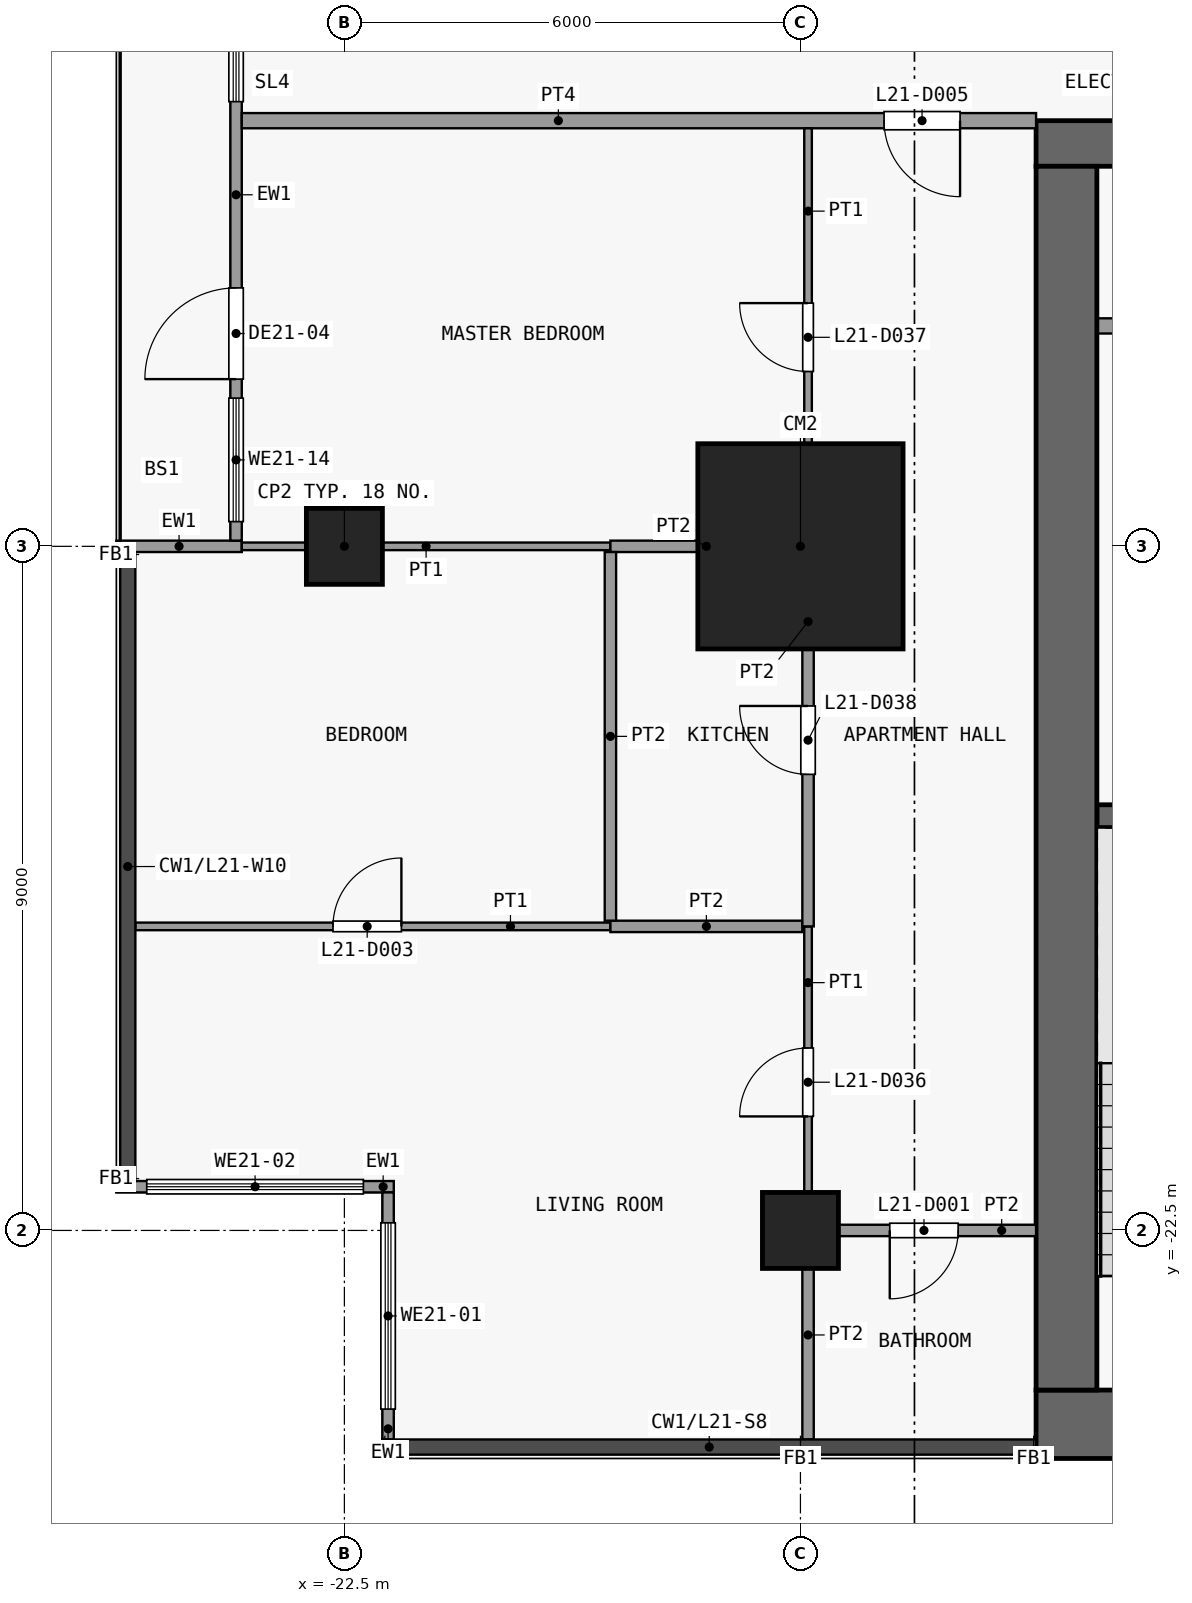
"""IFC4 building model, lengths in metres.
Left out: names, types, materials, properties, quantities, classifications, styles, units other than length and angle.
Written with IfcOpenShell. Run it as: python <this file> out.ifc"""

import sys

from ifc_helpers import new_model, si_unit, direction, frame, frame_2d, origin, origin_2d, place, context, subcontext, project, spatial, rectangle, extrude, element, fill, save


model = new_model("IFC4")
c1 = context("Model", 3, precision=1e-05, world=origin(), true_north=direction((0.0, 1.0)))
c2 = subcontext(c1, "Body", "Model", "MODEL_VIEW")
j1 = project(units=[si_unit("LENGTHUNIT", "METRE"), si_unit("PLANEANGLEUNIT", "RADIAN")], contexts=[c1])
p1 = place(None, origin())
s1 = spatial("IfcSite", under=j1, at=p1, CompositionType="ELEMENT")
p2 = place(p1, origin())
s2 = spatial("IfcBuilding", under=s1, at=p2, CompositionType="ELEMENT")
p3 = place(p2, frame((0.0, 0.0, 88.3)))
s3 = spatial("IfcBuildingStorey", under=s2, at=p3, CompositionType="ELEMENT", Elevation=88.3)
for number, where, z_axis, x_axis in (
    (1, (-22.5, -13.5, 0.0), (0.0, 0.0, 1.0), (1.0, 0.0, 0.0)),
    (2, (-16.5, -22.5, 0.0), (0.0, 0.0, 1.0), (1.0, 0.0, 0.0)),
):
    element("IfcColumn", number, at=place(p3, frame(where, z_axis=z_axis, x_axis=x_axis)), inside=s3, PredefinedType="COLUMN", context=c2, shape_type="SweptSolid", body=[
        extrude(rectangle(XDim=1.0, YDim=1.0, at=origin_2d()), origin(), (0.0, 0.0, 1.0), 3.6),
    ])
p4 = place(p3, frame((-16.5, -13.5, 0.0), z_axis=(0.0, 0.0, 1.0), x_axis=(1.0, 0.0, 0.0)))
e3 = element("IfcColumn", 3, at=p4, inside=s3, PredefinedType="COLUMN", context=c2, shape_type="SweptSolid", body=[
    extrude(rectangle(XDim=2.7, YDim=2.7, at=origin_2d()), origin(), (0.0, 0.0, 1.0), 3.6),
])
p5 = place(p3, frame((-13.4, -25.05, 0.0), z_axis=(0.0, 0.0, 1.0), x_axis=(1.0, 0.0, 0.0)))
e4 = element("IfcWall", 4, at=p5, inside=s3, PredefinedType="SHEAR", context=c2, shape_type="SweptSolid", body=[
    extrude(rectangle(XDim=26.8, YDim=0.9, at=frame_2d((13.4, 0.0))), origin(), (0.0, 0.0, 1.0), 3.3),
])
p6 = place(p3, frame((-13.4, -8.2, 0.0), z_axis=(0.0, 0.0, 1.0), x_axis=(1.0, 0.0, 0.0)))
e5 = element("IfcWall", 5, at=p6, inside=s3, PredefinedType="SHEAR", context=c2, shape_type="SweptSolid", body=[
    extrude(rectangle(XDim=26.8, YDim=0.6, at=frame_2d((13.4, 0.0))), origin(), (0.0, 0.0, 1.0), 3.3),
])
p7 = place(p6, frame((7.7, 0.0, 0.0)))
e6 = element("IfcOpeningElement", 6, at=p7, cuts=e5, PredefinedType="OPENING", context=c2, shape_type="SweptSolid", body=[
    extrude(rectangle(XDim=1.8, YDim=2.1, at=frame_2d((0.9, 1.05))), frame((0.0, 0.31, 0.0), z_axis=(0.0, -1.0, 0.0), x_axis=(1.0, 0.0, 0.0)), (0.0, 0.0, 1.0), 0.62),
])
p8 = place(p6, frame((17.3, 0.0, 0.0)))
e7 = element("IfcOpeningElement", 7, at=p8, cuts=e5, PredefinedType="OPENING", context=c2, shape_type="SweptSolid", body=[
    extrude(rectangle(XDim=1.8, YDim=2.1, at=frame_2d((0.9, 1.05))), frame((0.0, 0.31, 0.0), z_axis=(0.0, -1.0, 0.0), x_axis=(1.0, 0.0, 0.0)), (0.0, 0.0, 1.0), 0.62),
])
p9 = place(p6, frame((2.625, 0.0, 0.0)))
e8 = element("IfcOpeningElement", 8, at=p9, cuts=e5, PredefinedType="OPENING", context=c2, shape_type="SweptSolid", body=[
    extrude(rectangle(XDim=0.9, YDim=2.1, at=frame_2d((0.45, 1.05))), frame((0.0, 0.31, 0.0), z_axis=(0.0, -1.0, 0.0), x_axis=(1.0, 0.0, 0.0)), (0.0, 0.0, 1.0), 0.62),
])
p10 = place(p6, frame((23.275, 0.0, 0.0)))
e9 = element("IfcOpeningElement", 9, at=p10, cuts=e5, PredefinedType="OPENING", context=c2, shape_type="SweptSolid", body=[
    extrude(rectangle(XDim=0.9, YDim=2.1, at=frame_2d((0.45, 1.05))), frame((0.0, 0.31, 0.0), z_axis=(0.0, -1.0, 0.0), x_axis=(1.0, 0.0, 0.0)), (0.0, 0.0, 1.0), 0.62),
])
p11 = place(p3, frame((-13.0, -24.6, 0.0), z_axis=(0.0, 0.0, 1.0), x_axis=(0.0, 1.0, 0.0)))
e10 = element("IfcWall", 10, at=p11, inside=s3, PredefinedType="SHEAR", context=c2, shape_type="SweptSolid", body=[
    extrude(rectangle(XDim=16.1, YDim=0.8, at=frame_2d((8.05, 0.0))), origin(), (0.0, 0.0, 1.0), 3.3),
])
p12 = place(p3, frame((-12.6, -17.05, 0.0), z_axis=(0.0, 0.0, 1.0), x_axis=(1.0, 0.0, 0.0)))
e11 = element("IfcWall", 11, at=p12, inside=s3, PredefinedType="SHEAR", context=c2, shape_type="SweptSolid", body=[
    extrude(rectangle(XDim=2.85, YDim=0.3, at=frame_2d((1.425, 0.0))), origin(), (0.0, 0.0, 1.0), 3.3),
])
p13 = place(p3, frame((-12.6, -10.6, 0.0), z_axis=(0.0, 0.0, 1.0), x_axis=(1.0, 0.0, 0.0)))
e12 = element("IfcWall", 12, at=p13, inside=s3, PredefinedType="PARTITIONING", context=c2, shape_type="SweptSolid", body=[
    extrude(rectangle(XDim=1.45, YDim=0.2, at=frame_2d((0.725, 0.0))), origin(), (0.0, 0.0, 1.0), 3.3),
])
p14 = place(p3, frame((-21.925, -25.25, 0.0), z_axis=(0.0, 0.0, 1.0), x_axis=(0.0, 1.0, 0.0)))
e13 = element("IfcWall", 13, at=p14, inside=s3, PredefinedType="SOLIDWALL", context=c2, shape_type="SweptSolid", body=[
    extrude(rectangle(XDim=3.25, YDim=0.15, at=frame_2d((1.625, 0.0))), origin(), (0.0, 0.0, 1.0), 3.3),
])
p15 = place(p14, frame((0.4, 0.0, 0.9)))
e14 = element("IfcOpeningElement", 14, at=p15, cuts=e13, PredefinedType="OPENING", context=c2, shape_type="SweptSolid", body=[
    extrude(rectangle(XDim=2.45, YDim=2.4, at=frame_2d((1.225, 1.2))), frame((0.0, 0.085, 0.0), z_axis=(0.0, -1.0, 0.0), x_axis=(1.0, 0.0, 0.0)), (0.0, 0.0, 1.0), 0.17),
])
p16 = place(p3, frame((-21.85, -21.925, 0.0), z_axis=(0.0, 0.0, 1.0), x_axis=(-1.0, 0.0, 0.0)))
e15 = element("IfcWall", 15, at=p16, inside=s3, PredefinedType="SOLIDWALL", context=c2, shape_type="SweptSolid", body=[
    extrude(rectangle(XDim=3.65, YDim=0.15, at=frame_2d((1.825, 0.0))), origin(), (0.0, 0.0, 1.0), 3.3),
])
p17 = place(p16, frame((0.4, 0.0, 0.9)))
e16 = element("IfcOpeningElement", 16, at=p17, cuts=e15, PredefinedType="OPENING", context=c2, shape_type="SweptSolid", body=[
    extrude(rectangle(XDim=2.85, YDim=2.4, at=frame_2d((1.425, 1.2))), frame((0.0, 0.085, 0.0), z_axis=(0.0, -1.0, 0.0), x_axis=(1.0, 0.0, 0.0)), (0.0, 0.0, 1.0), 0.17),
])
p18 = place(p3, frame((-23.85, -13.5, 0.0), z_axis=(0.0, 0.0, 1.0), x_axis=(-1.0, 0.0, 0.0)))
e17 = element("IfcWall", 17, at=p18, inside=s3, PredefinedType="SOLIDWALL", context=c2, shape_type="SweptSolid", body=[
    extrude(rectangle(XDim=1.65, YDim=0.15, at=frame_2d((0.825, 0.0))), origin(), (0.0, 0.0, 1.0), 3.3),
])
p19 = place(p3, frame((-23.925, -13.425, 0.0), z_axis=(0.0, 0.0, 1.0), x_axis=(0.0, 1.0, 0.0)))
e18 = element("IfcWall", 18, at=p19, inside=s3, PredefinedType="SOLIDWALL", context=c2, shape_type="SweptSolid", body=[
    extrude(rectangle(XDim=8.85, YDim=0.15, at=frame_2d((4.425, 0.0))), origin(), (0.0, 0.0, 1.0), 3.3),
])
p20 = place(p19, frame((2.125, 0.0, 0.0)))
e19 = element("IfcOpeningElement", 19, at=p20, cuts=e18, PredefinedType="OPENING", context=c2, shape_type="SweptSolid", body=[
    extrude(rectangle(XDim=1.2, YDim=2.4, at=frame_2d((0.6, 1.2))), frame((0.0, 0.085, 0.0), z_axis=(0.0, -1.0, 0.0), x_axis=(1.0, 0.0, 0.0)), (0.0, 0.0, 1.0), 0.17),
])
p21 = place(p19, frame((0.25, 0.0, 0.9)))
e20 = element("IfcOpeningElement", 20, at=p21, cuts=e18, PredefinedType="OPENING", context=c2, shape_type="SweptSolid", body=[
    extrude(rectangle(XDim=1.625, YDim=2.1, at=frame_2d((0.812, 1.05))), frame((0.0, 0.085, 0.0), z_axis=(0.0, -1.0, 0.0), x_axis=(1.0, 0.0, 0.0)), (0.0, 0.0, 1.0), 0.17),
])
p22 = place(p19, frame((5.775, 0.0, 0.9)))
e21 = element("IfcOpeningElement", 21, at=p22, cuts=e18, PredefinedType="OPENING", context=c2, shape_type="SweptSolid", body=[
    extrude(rectangle(XDim=1.812, YDim=2.1, at=frame_2d((0.906, 1.05))), frame((0.0, 0.085, 0.0), z_axis=(0.0, -1.0, 0.0), x_axis=(1.0, 0.0, 0.0)), (0.0, 0.0, 1.0), 0.17),
])
p23 = place(p3, frame((-16.325, -22.5, 0.0), z_axis=(0.0, 0.0, 1.0), x_axis=(1.0, 0.0, 0.0)))
e22 = element("IfcWall", 22, at=p23, inside=s3, PredefinedType="PARTITIONING", context=c2, shape_type="SweptSolid", body=[
    extrude(rectangle(XDim=2.925, YDim=0.15, at=frame_2d((1.462, 0.0))), origin(), (0.0, 0.0, 1.0), 3.3),
])
p24 = place(p23, frame((1.0, 0.0, 0.0)))
e23 = element("IfcOpeningElement", 23, at=p24, cuts=e22, PredefinedType="OPENING", context=c2, shape_type="SweptSolid", body=[
    extrude(rectangle(XDim=0.9, YDim=2.1, at=frame_2d((0.45, 1.05))), frame((0.0, 0.085, 0.0), z_axis=(0.0, -1.0, 0.0), x_axis=(1.0, 0.0, 0.0)), (0.0, 0.0, 1.0), 0.17),
])
p25 = place(p3, frame((-25.25, -18.5, 0.0), z_axis=(0.0, 0.0, 1.0), x_axis=(1.0, 0.0, 0.0)))
e24 = element("IfcWall", 24, at=p25, inside=s3, PredefinedType="PARTITIONING", context=c2, shape_type="SweptSolid", body=[
    extrude(rectangle(XDim=6.25, YDim=0.1, at=frame_2d((3.125, 0.0))), origin(), (0.0, 0.0, 1.0), 3.3),
])
p26 = place(p25, frame((2.6, 0.0, 0.0)))
e25 = element("IfcOpeningElement", 25, at=p26, cuts=e24, PredefinedType="OPENING", context=c2, shape_type="SweptSolid", body=[
    extrude(rectangle(XDim=0.9, YDim=2.1, at=frame_2d((0.45, 1.05))), frame((0.0, 0.06, 0.0), z_axis=(0.0, -1.0, 0.0), x_axis=(1.0, 0.0, 0.0)), (0.0, 0.0, 1.0), 0.12),
])
p27 = place(p3, frame((-19.0, -18.5, 0.0), z_axis=(0.0, 0.0, 1.0), x_axis=(1.0, 0.0, 0.0)))
e26 = element("IfcWall", 26, at=p27, inside=s3, PredefinedType="PARTITIONING", context=c2, shape_type="SweptSolid", body=[
    extrude(rectangle(XDim=2.525, YDim=0.15, at=frame_2d((1.262, 0.0))), origin(), (0.0, 0.0, 1.0), 3.3),
])
p28 = place(p3, frame((-23.85, -13.5, 0.0), z_axis=(0.0, 0.0, 1.0), x_axis=(1.0, 0.0, 0.0)))
e27 = element("IfcWall", 27, at=p28, inside=s3, PredefinedType="PARTITIONING", context=c2, shape_type="SweptSolid", body=[
    extrude(rectangle(XDim=4.85, YDim=0.1, at=frame_2d((2.425, 0.0))), origin(), (0.0, 0.0, 1.0), 3.3),
])
p29 = place(p3, frame((-19.0, -13.5, 0.0), z_axis=(0.0, 0.0, 1.0), x_axis=(1.0, 0.0, 0.0)))
e28 = element("IfcWall", 28, at=p29, inside=s3, PredefinedType="PARTITIONING", context=c2, shape_type="SweptSolid", body=[
    extrude(rectangle(XDim=2.525, YDim=0.15, at=frame_2d((1.262, 0.0))), origin(), (0.0, 0.0, 1.0), 3.3),
])
p30 = place(p3, frame((-23.85, -7.9, 0.0), z_axis=(0.0, 0.0, 1.0), x_axis=(1.0, 0.0, 0.0)))
e29 = element("IfcWall", 29, at=p30, inside=s3, PredefinedType="PARTITIONING", context=c2, shape_type="SweptSolid", body=[
    extrude(rectangle(XDim=10.45, YDim=0.2, at=frame_2d((5.225, 0.0))), origin(), (0.0, 0.0, 1.0), 3.3),
])
p31 = place(p30, frame((8.45, 0.0, 0.0)))
e30 = element("IfcOpeningElement", 30, at=p31, cuts=e29, PredefinedType="OPENING", context=c2, shape_type="SweptSolid", body=[
    extrude(rectangle(XDim=1.0, YDim=2.1, at=frame_2d((0.5, 1.05))), frame((0.0, 0.11, 0.0), z_axis=(0.0, -1.0, 0.0), x_axis=(1.0, 0.0, 0.0)), (0.0, 0.0, 1.0), 0.22),
])
p32 = place(p3, frame((-19.0, -18.425, 0.0), z_axis=(0.0, 0.0, 1.0), x_axis=(0.0, 1.0, 0.0)))
e31 = element("IfcWall", 31, at=p32, inside=s3, PredefinedType="PARTITIONING", context=c2, shape_type="SweptSolid", body=[
    extrude(rectangle(XDim=4.85, YDim=0.15, at=frame_2d((2.425, 0.0))), origin(), (0.0, 0.0, 1.0), 3.3),
])
p33 = place(p3, frame((-16.4, -22.5, 0.0), z_axis=(0.0, 0.0, 1.0), x_axis=(0.0, 1.0, 0.0)))
e32 = element("IfcWall", 32, at=p33, inside=s3, PredefinedType="PARTITIONING", context=c2, shape_type="SweptSolid", body=[
    extrude(rectangle(XDim=4.0, YDim=0.1, at=frame_2d((2.0, 0.0))), origin(), (0.0, 0.0, 1.0), 3.3),
])
p34 = place(p33, frame((1.5, 0.0, 0.0)))
e33 = element("IfcOpeningElement", 33, at=p34, cuts=e32, PredefinedType="OPENING", context=c2, shape_type="SweptSolid", body=[
    extrude(rectangle(XDim=0.9, YDim=2.1, at=frame_2d((0.45, 1.05))), frame((0.0, 0.06, 0.0), z_axis=(0.0, -1.0, 0.0), x_axis=(1.0, 0.0, 0.0)), (0.0, 0.0, 1.0), 0.12),
])
p35 = place(p3, frame((-16.4, -13.5, 0.0), z_axis=(0.0, 0.0, 1.0), x_axis=(0.0, 1.0, 0.0)))
e34 = element("IfcWall", 34, at=p35, inside=s3, PredefinedType="PARTITIONING", context=c2, shape_type="SweptSolid", body=[
    extrude(rectangle(XDim=5.5, YDim=0.1, at=frame_2d((2.75, 0.0))), origin(), (0.0, 0.0, 1.0), 3.3),
])
p36 = place(p35, frame((2.3, 0.0, 0.0)))
e35 = element("IfcOpeningElement", 35, at=p36, cuts=e34, PredefinedType="OPENING", context=c2, shape_type="SweptSolid", body=[
    extrude(rectangle(XDim=0.9, YDim=2.1, at=frame_2d((0.45, 1.05))), frame((0.0, 0.06, 0.0), z_axis=(0.0, -1.0, 0.0), x_axis=(1.0, 0.0, 0.0)), (0.0, 0.0, 1.0), 0.12),
])
p37 = place(p3, frame((-16.4, -25.25, 0.0), z_axis=(0.0, 0.0, 1.0), x_axis=(0.0, 1.0, 0.0)))
e36 = element("IfcWall", 36, at=p37, inside=s3, PredefinedType="PARTITIONING", context=c2, shape_type="SweptSolid", body=[
    extrude(rectangle(XDim=2.75, YDim=0.15, at=frame_2d((1.375, 0.0))), origin(), (0.0, 0.0, 1.0), 3.3),
])
p38 = place(p3, frame((-16.4, -18.5, 0.0), z_axis=(0.0, 0.0, 1.0), x_axis=(0.0, 1.0, 0.0)))
e37 = element("IfcWall", 37, at=p38, inside=s3, PredefinedType="PARTITIONING", context=c2, shape_type="SweptSolid", body=[
    extrude(rectangle(XDim=5.0, YDim=0.15, at=frame_2d((2.5, 0.0))), origin(), (0.0, 0.0, 1.0), 3.3),
])
p39 = place(p38, frame((2.0, 0.0, 0.0)))
e38 = element("IfcOpeningElement", 38, at=p39, cuts=e37, PredefinedType="OPENING", context=c2, shape_type="SweptSolid", body=[
    extrude(rectangle(XDim=0.9, YDim=2.1, at=frame_2d((0.45, 1.05))), frame((0.0, 0.085, 0.0), z_axis=(0.0, -1.0, 0.0), x_axis=(1.0, 0.0, 0.0)), (0.0, 0.0, 1.0), 0.17),
])
p40 = place(p15, origin())
e39 = element("IfcWindow", 39, at=p40, inside=s3, PartitioningType="SINGLE_PANEL", PredefinedType="WINDOW", context=c2, shape_type="SweptSolid", body=[
    extrude(rectangle(XDim=2.45, YDim=2.4, at=frame_2d((1.225, 1.2))), frame((0.0, 0.03, 0.0), z_axis=(0.0, -1.0, 0.0), x_axis=(1.0, 0.0, 0.0)), (0.0, 0.0, 1.0), 0.06),
])
fill(e14, e39)
p41 = place(p17, origin())
e40 = element("IfcWindow", 40, at=p41, inside=s3, PartitioningType="SINGLE_PANEL", PredefinedType="WINDOW", context=c2, shape_type="SweptSolid", body=[
    extrude(rectangle(XDim=2.85, YDim=2.4, at=frame_2d((1.425, 1.2))), frame((0.0, 0.03, 0.0), z_axis=(0.0, -1.0, 0.0), x_axis=(1.0, 0.0, 0.0)), (0.0, 0.0, 1.0), 0.06),
])
fill(e16, e40)
p42 = place(p20, origin())
e41 = element("IfcDoor", 41, at=p42, inside=s3, OperationType="SINGLE_SWING_LEFT", PredefinedType="DOOR", context=c2, shape_type="SweptSolid", body=[
    extrude(rectangle(XDim=1.2, YDim=2.4, at=frame_2d((0.6, 1.2))), frame((0.0, 0.025, 0.0), z_axis=(0.0, -1.0, 0.0), x_axis=(1.0, 0.0, 0.0)), (0.0, 0.0, 1.0), 0.05),
])
fill(e19, e41)
p43 = place(p21, origin())
e42 = element("IfcWindow", 42, at=p43, inside=s3, PartitioningType="SINGLE_PANEL", PredefinedType="WINDOW", context=c2, shape_type="SweptSolid", body=[
    extrude(rectangle(XDim=1.625, YDim=2.1, at=frame_2d((0.812, 1.05))), frame((0.0, 0.03, 0.0), z_axis=(0.0, -1.0, 0.0), x_axis=(1.0, 0.0, 0.0)), (0.0, 0.0, 1.0), 0.06),
])
fill(e20, e42)
p44 = place(p22, origin())
e43 = element("IfcWindow", 43, at=p44, inside=s3, PartitioningType="SINGLE_PANEL", PredefinedType="WINDOW", context=c2, shape_type="SweptSolid", body=[
    extrude(rectangle(XDim=1.812, YDim=2.1, at=frame_2d((0.906, 1.05))), frame((0.0, 0.03, 0.0), z_axis=(0.0, -1.0, 0.0), x_axis=(1.0, 0.0, 0.0)), (0.0, 0.0, 1.0), 0.06),
])
fill(e21, e43)
p45 = place(p24, origin())
e44 = element("IfcDoor", 44, at=p45, inside=s3, OperationType="SINGLE_SWING_LEFT", PredefinedType="DOOR", context=c2, shape_type="SweptSolid", body=[
    extrude(rectangle(XDim=0.9, YDim=2.1, at=frame_2d((0.45, 1.05))), frame((0.0, 0.025, 0.0), z_axis=(0.0, -1.0, 0.0), x_axis=(1.0, 0.0, 0.0)), (0.0, 0.0, 1.0), 0.05),
])
fill(e23, e44)
p46 = place(p26, origin())
e45 = element("IfcDoor", 45, at=p46, inside=s3, OperationType="SINGLE_SWING_LEFT", PredefinedType="DOOR", context=c2, shape_type="SweptSolid", body=[
    extrude(rectangle(XDim=0.9, YDim=2.1, at=frame_2d((0.45, 1.05))), frame((0.0, 0.025, 0.0), z_axis=(0.0, -1.0, 0.0), x_axis=(1.0, 0.0, 0.0)), (0.0, 0.0, 1.0), 0.05),
])
fill(e25, e45)
p47 = place(p31, origin())
e46 = element("IfcDoor", 46, at=p47, inside=s3, OperationType="SINGLE_SWING_RIGHT", PredefinedType="DOOR", context=c2, shape_type="SweptSolid", body=[
    extrude(rectangle(XDim=1.0, YDim=2.1, at=frame_2d((0.5, 1.05))), frame((0.0, 0.025, 0.0), z_axis=(0.0, -1.0, 0.0), x_axis=(1.0, 0.0, 0.0)), (0.0, 0.0, 1.0), 0.05),
])
fill(e30, e46)
p48 = place(p34, origin())
e47 = element("IfcDoor", 47, at=p48, inside=s3, OperationType="SINGLE_SWING_RIGHT", PredefinedType="DOOR", context=c2, shape_type="SweptSolid", body=[
    extrude(rectangle(XDim=0.9, YDim=2.1, at=frame_2d((0.45, 1.05))), frame((0.0, 0.025, 0.0), z_axis=(0.0, -1.0, 0.0), x_axis=(1.0, 0.0, 0.0)), (0.0, 0.0, 1.0), 0.05),
])
fill(e33, e47)
p49 = place(p36, origin())
e48 = element("IfcDoor", 48, at=p49, inside=s3, OperationType="SINGLE_SWING_LEFT", PredefinedType="DOOR", context=c2, shape_type="SweptSolid", body=[
    extrude(rectangle(XDim=0.9, YDim=2.1, at=frame_2d((0.45, 1.05))), frame((0.0, 0.025, 0.0), z_axis=(0.0, -1.0, 0.0), x_axis=(1.0, 0.0, 0.0)), (0.0, 0.0, 1.0), 0.05),
])
fill(e35, e48)
p50 = place(p39, origin())
e49 = element("IfcDoor", 49, at=p50, inside=s3, OperationType="SINGLE_SWING_LEFT", PredefinedType="DOOR", context=c2, shape_type="SweptSolid", body=[
    extrude(rectangle(XDim=0.9, YDim=2.1, at=frame_2d((0.45, 1.05))), frame((0.0, 0.025, 0.0), z_axis=(0.0, -1.0, 0.0), x_axis=(1.0, 0.0, 0.0)), (0.0, 0.0, 1.0), 0.05),
])
fill(e38, e49)
save(model, sys.argv[1])
